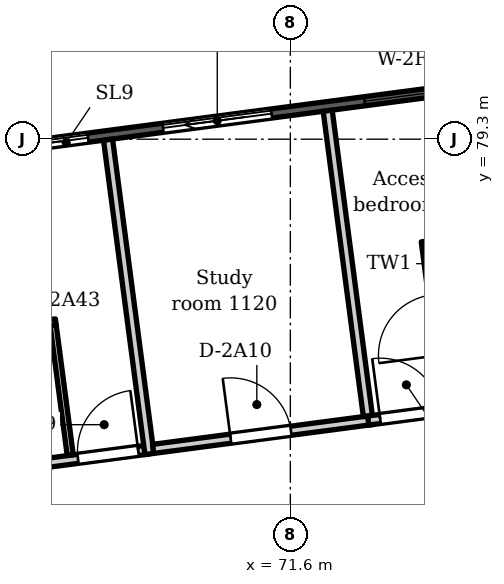
"""IFC4 building model, lengths in metres.
Left out: names, types, materials, properties, quantities, classifications, styles, units other than length and angle.
Written with IfcOpenShell. Run it as: python <this file> out.ifc"""

import sys

from ifc_helpers import new_model, si_unit, direction, frame, frame_2d, origin, place, context, subcontext, project, spatial, polyline, rectangle, outline, extrude, element, fill, save


model = new_model("IFC4")
c1 = context("Model", 3, precision=1e-05, world=origin(), true_north=direction((0.0, 1.0)))
c2 = subcontext(c1, "Body", "Model", "MODEL_VIEW")
j1 = project(units=[si_unit("LENGTHUNIT", "METRE"), si_unit("PLANEANGLEUNIT", "RADIAN")], contexts=[c1])
p1 = place(None, origin())
s1 = spatial("IfcSite", under=j1, at=p1, CompositionType="ELEMENT")
p2 = place(p1, origin())
s2 = spatial("IfcBuilding", under=s1, at=p2, CompositionType="ELEMENT")
p3 = place(p2, frame((0.0, 0.0, 50.4)))
s3 = spatial("IfcBuildingStorey", under=s2, at=p3, CompositionType="ELEMENT", Elevation=50.4)
p4 = place(p3, frame((77.35, 72.992, 0.0), z_axis=(0.0, 0.0, 1.0), x_axis=(-0.866037463336, -0.499979111662, 0.0)))
e1 = element("IfcWall", 1, at=p4, inside=s3, PredefinedType="SHEAR", context=c2, shape_type="SweptSolid", body=[
    extrude(outline(polyline([(0.0, -0.6), (5.901, -0.6), (5.58, 0.6), (0.322, 0.6), (0.0, -0.6)])), origin(), (0.0, 0.0, 1.0), 3.6),
])
p5 = place(p4, frame((1.175, 0.0, 0.0)))
e2 = element("IfcOpeningElement", 2, at=p5, cuts=e1, PredefinedType="OPENING", context=c2, shape_type="SweptSolid", body=[
    extrude(rectangle(XDim=0.9, YDim=2.1, at=frame_2d((0.45, 1.05))), frame((0.0, 0.61, 0.0), z_axis=(0.0, -1.0, 0.0), x_axis=(1.0, 0.0, 0.0)), (0.0, 0.0, 1.0), 1.22),
])
p6 = place(p3, frame((54.142, 77.465, 0.0), z_axis=(0.0, 0.0, 1.0), x_axis=(0.991444696532, 0.130527444308, 0.0)))
e3 = element("IfcWall", 3, at=p6, inside=s3, PredefinedType="SOLIDWALL", context=c2, shape_type="SweptSolid", body=[
    extrude(outline(polyline([(0.149, 0.075), (0.149, -0.075), (47.217, -0.075), (47.217, 0.075), (0.149, 0.075)])), origin(), (0.0, 0.0, 1.0), 3.3),
])
p7 = place(p6, frame((1.222, 0.0, 0.0)))
e4 = element("IfcOpeningElement", 4, at=p7, cuts=e3, PredefinedType="OPENING", context=c2, shape_type="SweptSolid", body=[
    extrude(rectangle(XDim=1.8, YDim=2.6, at=frame_2d((0.9, 1.3))), frame((0.0, 0.085, 0.0), z_axis=(0.0, -1.0, 0.0), x_axis=(1.0, 0.0, 0.0)), (0.0, 0.0, 1.0), 0.17),
])
p8 = place(p6, frame((4.565, 0.0, 0.0)))
e5 = element("IfcOpeningElement", 5, at=p8, cuts=e3, PredefinedType="OPENING", context=c2, shape_type="SweptSolid", body=[
    extrude(rectangle(XDim=1.8, YDim=2.6, at=frame_2d((0.9, 1.3))), frame((0.0, 0.085, 0.0), z_axis=(0.0, -1.0, 0.0), x_axis=(1.0, 0.0, 0.0)), (0.0, 0.0, 1.0), 0.17),
])
p9 = place(p6, frame((8.209, 0.0, 0.0)))
e6 = element("IfcOpeningElement", 6, at=p9, cuts=e3, PredefinedType="OPENING", context=c2, shape_type="SweptSolid", body=[
    extrude(rectangle(XDim=1.8, YDim=2.6, at=frame_2d((0.9, 1.3))), frame((0.0, 0.085, 0.0), z_axis=(0.0, -1.0, 0.0), x_axis=(1.0, 0.0, 0.0)), (0.0, 0.0, 1.0), 0.17),
])
p10 = place(p6, frame((12.453, 0.0, 0.0)))
e7 = element("IfcOpeningElement", 7, at=p10, cuts=e3, PredefinedType="OPENING", context=c2, shape_type="SweptSolid", body=[
    extrude(rectangle(XDim=1.8, YDim=2.6, at=frame_2d((0.9, 1.3))), frame((0.0, 0.085, 0.0), z_axis=(0.0, -1.0, 0.0), x_axis=(1.0, 0.0, 0.0)), (0.0, 0.0, 1.0), 0.17),
])
p11 = place(p6, frame((15.496, 0.0, 0.0)))
e8 = element("IfcOpeningElement", 8, at=p11, cuts=e3, PredefinedType="OPENING", context=c2, shape_type="SweptSolid", body=[
    extrude(rectangle(XDim=1.8, YDim=2.6, at=frame_2d((0.9, 1.3))), frame((0.0, 0.085, 0.0), z_axis=(0.0, -1.0, 0.0), x_axis=(1.0, 0.0, 0.0)), (0.0, 0.0, 1.0), 0.17),
])
p12 = place(p6, frame((18.84, 0.0, 0.15)))
e9 = element("IfcOpeningElement", 9, at=p12, cuts=e3, PredefinedType="OPENING", context=c2, shape_type="SweptSolid", body=[
    extrude(rectangle(XDim=2.4, YDim=2.45, at=frame_2d((1.2, 1.225))), frame((0.0, 0.085, 0.0), z_axis=(0.0, -1.0, 0.0), x_axis=(1.0, 0.0, 0.0)), (0.0, 0.0, 1.0), 0.17),
])
p13 = place(p6, frame((22.783, 0.0, 0.0)))
e10 = element("IfcOpeningElement", 10, at=p13, cuts=e3, PredefinedType="OPENING", context=c2, shape_type="SweptSolid", body=[
    extrude(rectangle(XDim=1.8, YDim=2.6, at=frame_2d((0.9, 1.3))), frame((0.0, 0.085, 0.0), z_axis=(0.0, -1.0, 0.0), x_axis=(1.0, 0.0, 0.0)), (0.0, 0.0, 1.0), 0.17),
])
p14 = place(p6, frame((26.127, 0.0, 0.15)))
e11 = element("IfcOpeningElement", 11, at=p14, cuts=e3, PredefinedType="OPENING", context=c2, shape_type="SweptSolid", body=[
    extrude(rectangle(XDim=2.4, YDim=2.45, at=frame_2d((1.2, 1.225))), frame((0.0, 0.085, 0.0), z_axis=(0.0, -1.0, 0.0), x_axis=(1.0, 0.0, 0.0)), (0.0, 0.0, 1.0), 0.17),
])
p15 = place(p6, frame((30.071, 0.0, 0.0)))
e12 = element("IfcOpeningElement", 12, at=p15, cuts=e3, PredefinedType="OPENING", context=c2, shape_type="SweptSolid", body=[
    extrude(rectangle(XDim=1.8, YDim=2.6, at=frame_2d((0.9, 1.3))), frame((0.0, 0.085, 0.0), z_axis=(0.0, -1.0, 0.0), x_axis=(1.0, 0.0, 0.0)), (0.0, 0.0, 1.0), 0.17),
])
p16 = place(p6, frame((33.114, 0.0, 0.0)))
e13 = element("IfcOpeningElement", 13, at=p16, cuts=e3, PredefinedType="OPENING", context=c2, shape_type="SweptSolid", body=[
    extrude(rectangle(XDim=1.8, YDim=2.6, at=frame_2d((0.9, 1.3))), frame((0.0, 0.085, 0.0), z_axis=(0.0, -1.0, 0.0), x_axis=(1.0, 0.0, 0.0)), (0.0, 0.0, 1.0), 0.17),
])
p17 = place(p6, frame((37.358, 0.0, 0.0)))
e14 = element("IfcOpeningElement", 14, at=p17, cuts=e3, PredefinedType="OPENING", context=c2, shape_type="SweptSolid", body=[
    extrude(rectangle(XDim=1.8, YDim=2.6, at=frame_2d((0.9, 1.3))), frame((0.0, 0.085, 0.0), z_axis=(0.0, -1.0, 0.0), x_axis=(1.0, 0.0, 0.0)), (0.0, 0.0, 1.0), 0.17),
])
p18 = place(p6, frame((41.001, 0.0, 0.0)))
e15 = element("IfcOpeningElement", 15, at=p18, cuts=e3, PredefinedType="OPENING", context=c2, shape_type="SweptSolid", body=[
    extrude(rectangle(XDim=1.8, YDim=2.6, at=frame_2d((0.9, 1.3))), frame((0.0, 0.085, 0.0), z_axis=(0.0, -1.0, 0.0), x_axis=(1.0, 0.0, 0.0)), (0.0, 0.0, 1.0), 0.17),
])
p19 = place(p6, frame((44.345, 0.0, 0.0)))
e16 = element("IfcOpeningElement", 16, at=p19, cuts=e3, PredefinedType="OPENING", context=c2, shape_type="SweptSolid", body=[
    extrude(rectangle(XDim=1.8, YDim=2.6, at=frame_2d((0.9, 1.3))), frame((0.0, 0.085, 0.0), z_axis=(0.0, -1.0, 0.0), x_axis=(1.0, 0.0, 0.0)), (0.0, 0.0, 1.0), 0.17),
])
p20 = place(p3, frame((65.438, 75.993, 0.0), z_axis=(0.0, 0.0, 1.0), x_axis=(0.991499984132, 0.130106807916, 0.0)))
e17 = element("IfcWall", 17, at=p20, inside=s3, PredefinedType="PARTITIONING", context=c2, shape_type="SweptSolid", body=[
    extrude(rectangle(XDim=2.325, YDim=0.1, at=frame_2d((1.163, 0.0))), origin(), (0.0, 0.0, 1.0), 3.3),
])
p21 = place(p20, frame((0.637, 0.0, 0.0)))
e18 = element("IfcOpeningElement", 18, at=p21, cuts=e17, PredefinedType="OPENING", context=c2, shape_type="SweptSolid", body=[
    extrude(rectangle(XDim=1.0, YDim=2.1, at=frame_2d((0.5, 1.05))), frame((0.0, 0.06, 0.0), z_axis=(0.0, -1.0, 0.0), x_axis=(1.0, 0.0, 0.0)), (0.0, 0.0, 1.0), 0.12),
])
p22 = place(p3, frame((65.656, 73.721, 0.0), z_axis=(0.0, 0.0, 1.0), x_axis=(0.991433351305, 0.130613590106, 0.0)))
e19 = element("IfcWall", 19, at=p22, inside=s3, PredefinedType="PARTITIONING", context=c2, shape_type="SweptSolid", body=[
    extrude(rectangle(XDim=3.652, YDim=0.15, at=frame_2d((1.826, 0.0))), origin(), (0.0, 0.0, 1.0), 3.3),
])
p23 = place(p22, frame((2.473, 0.0, 0.0)))
e20 = element("IfcOpeningElement", 20, at=p23, cuts=e19, PredefinedType="OPENING", context=c2, shape_type="SweptSolid", body=[
    extrude(rectangle(XDim=1.0, YDim=2.1, at=frame_2d((0.5, 1.05))), frame((0.0, 0.085, 0.0), z_axis=(0.0, -1.0, 0.0), x_axis=(1.0, 0.0, 0.0)), (0.0, 0.0, 1.0), 0.17),
])
p24 = place(p3, frame((67.699, 76.24, 0.0), z_axis=(0.0, 0.0, 1.0), x_axis=(0.130322595805, -0.991471644084, 0.0)))
e21 = element("IfcWall", 21, at=p24, inside=s3, PredefinedType="PARTITIONING", context=c2, shape_type="SweptSolid", body=[
    extrude(rectangle(XDim=2.154, YDim=0.1, at=frame_2d((1.077, 0.0))), origin(), (0.0, 0.0, 1.0), 3.3),
])
p25 = place(p3, frame((68.602, 79.292, 0.0), z_axis=(0.0, 0.0, 1.0), x_axis=(0.130516294002, -0.991446164449, 0.0)))
e22 = element("IfcWall", 22, at=p25, inside=s3, PredefinedType="PARTITIONING", context=c2, shape_type="SweptSolid", body=[
    extrude(rectangle(XDim=5.213, YDim=0.15, at=frame_2d((2.607, 0.0))), origin(), (0.0, 0.0, 1.0), 3.3),
])
p26 = place(p3, frame((69.344, 74.207, 0.0), z_axis=(0.0, 0.0, 1.0), x_axis=(0.991427646688, 0.130656884173, 0.0)))
e23 = element("IfcWall", 23, at=p26, inside=s3, PredefinedType="PARTITIONING", context=c2, shape_type="SweptSolid", body=[
    extrude(rectangle(XDim=3.651, YDim=0.15, at=frame_2d((1.826, 0.0))), origin(), (0.0, 0.0, 1.0), 3.3),
])
p27 = place(p26, frame((1.286, 0.0, 0.0)))
e24 = element("IfcOpeningElement", 24, at=p27, cuts=e23, PredefinedType="OPENING", context=c2, shape_type="SweptSolid", body=[
    extrude(rectangle(XDim=1.0, YDim=2.1, at=frame_2d((0.5, 1.05))), frame((0.0, 0.085, 0.0), z_axis=(0.0, -1.0, 0.0), x_axis=(1.0, 0.0, 0.0)), (0.0, 0.0, 1.0), 0.17),
])
p28 = place(p3, frame((72.214, 79.768, 0.0), z_axis=(0.0, 0.0, 1.0), x_axis=(0.130546792746, -0.991442149045, 0.0)))
e25 = element("IfcWall", 25, at=p28, inside=s3, PredefinedType="PARTITIONING", context=c2, shape_type="SweptSolid", body=[
    extrude(rectangle(XDim=5.064, YDim=0.15, at=frame_2d((2.532, 0.0))), origin(), (0.0, 0.0, 1.0), 3.3),
])
p29 = place(p3, frame((72.881, 74.673, 0.0), z_axis=(0.0, 0.0, 1.0), x_axis=(0.991447742753, 0.130504304105, 0.0)))
e26 = element("IfcWall", 26, at=p29, inside=s3, PredefinedType="PARTITIONING", context=c2, shape_type="SweptSolid", body=[
    extrude(rectangle(XDim=3.171, YDim=0.15, at=frame_2d((1.585, 0.0))), origin(), (0.0, 0.0, 1.0), 3.3),
])
p30 = place(p29, frame((0.198, 0.0, 0.0)))
e27 = element("IfcOpeningElement", 27, at=p30, cuts=e26, PredefinedType="OPENING", context=c2, shape_type="SweptSolid", body=[
    extrude(rectangle(XDim=1.0, YDim=2.1, at=frame_2d((0.5, 1.05))), frame((0.0, 0.085, 0.0), z_axis=(0.0, -1.0, 0.0), x_axis=(1.0, 0.0, 0.0)), (0.0, 0.0, 1.0), 0.17),
])
p31 = place(p3, frame((73.802, 77.619, 0.0), z_axis=(0.0, 0.0, 1.0), x_axis=(0.130514759302, -0.991446366479, 0.0)))
e28 = element("IfcWall", 28, at=p31, inside=s3, PredefinedType="PARTITIONING", context=c2, shape_type="SweptSolid", body=[
    extrude(rectangle(XDim=2.725, YDim=0.1, at=frame_2d((1.363, 0.0))), origin(), (0.0, 0.0, 1.0), 3.3),
])
p32 = place(p31, frame((0.888, 0.0, 0.0)))
e29 = element("IfcOpeningElement", 29, at=p32, cuts=e28, PredefinedType="OPENING", context=c2, shape_type="SweptSolid", body=[
    extrude(rectangle(XDim=1.0, YDim=2.1, at=frame_2d((0.5, 1.05))), frame((0.0, 0.06, 0.0), z_axis=(0.0, -1.0, 0.0), x_axis=(1.0, 0.0, 0.0)), (0.0, 0.0, 1.0), 0.12),
])
p33 = place(p10, origin())
e30 = element("IfcDoor", 30, at=p33, inside=s3, OperationType="SLIDING_TO_LEFT", PredefinedType="DOOR", context=c2, shape_type="SweptSolid", body=[
    extrude(rectangle(XDim=1.8, YDim=2.6, at=frame_2d((0.9, 1.3))), frame((0.0, 0.025, 0.0), z_axis=(0.0, -1.0, 0.0), x_axis=(1.0, 0.0, 0.0)), (0.0, 0.0, 1.0), 0.05),
])
fill(e7, e30)
p34 = place(p11, origin())
e31 = element("IfcDoor", 31, at=p34, inside=s3, OperationType="SLIDING_TO_LEFT", PredefinedType="DOOR", context=c2, shape_type="SweptSolid", body=[
    extrude(rectangle(XDim=1.8, YDim=2.6, at=frame_2d((0.9, 1.3))), frame((0.0, 0.025, 0.0), z_axis=(0.0, -1.0, 0.0), x_axis=(1.0, 0.0, 0.0)), (0.0, 0.0, 1.0), 0.05),
])
fill(e8, e31)
p35 = place(p12, origin())
e32 = element("IfcWindow", 32, at=p35, inside=s3, PartitioningType="SINGLE_PANEL", PredefinedType="WINDOW", context=c2, shape_type="SweptSolid", body=[
    extrude(rectangle(XDim=2.4, YDim=2.45, at=frame_2d((1.2, 1.225))), frame((0.0, 0.03, 0.0), z_axis=(0.0, -1.0, 0.0), x_axis=(1.0, 0.0, 0.0)), (0.0, 0.0, 1.0), 0.06),
])
fill(e9, e32)
p36 = place(p23, origin())
e33 = element("IfcDoor", 33, at=p36, inside=s3, OperationType="SINGLE_SWING_RIGHT", PredefinedType="DOOR", context=c2, shape_type="SweptSolid", body=[
    extrude(rectangle(XDim=1.0, YDim=2.1, at=frame_2d((0.5, 1.05))), frame((0.0, 0.025, 0.0), z_axis=(0.0, -1.0, 0.0), x_axis=(1.0, 0.0, 0.0)), (0.0, 0.0, 1.0), 0.05),
])
fill(e20, e33)
p37 = place(p27, origin())
e34 = element("IfcDoor", 34, at=p37, inside=s3, OperationType="SINGLE_SWING_LEFT", PredefinedType="DOOR", context=c2, shape_type="SweptSolid", body=[
    extrude(rectangle(XDim=1.0, YDim=2.1, at=frame_2d((0.5, 1.05))), frame((0.0, 0.025, 0.0), z_axis=(0.0, -1.0, 0.0), x_axis=(1.0, 0.0, 0.0)), (0.0, 0.0, 1.0), 0.05),
])
fill(e24, e34)
p38 = place(p30, origin())
e35 = element("IfcDoor", 35, at=p38, inside=s3, OperationType="SINGLE_SWING_LEFT", PredefinedType="DOOR", context=c2, shape_type="SweptSolid", body=[
    extrude(rectangle(XDim=1.0, YDim=2.1, at=frame_2d((0.5, 1.05))), frame((0.0, 0.025, 0.0), z_axis=(0.0, -1.0, 0.0), x_axis=(1.0, 0.0, 0.0)), (0.0, 0.0, 1.0), 0.05),
])
fill(e27, e35)
save(model, sys.argv[1])
